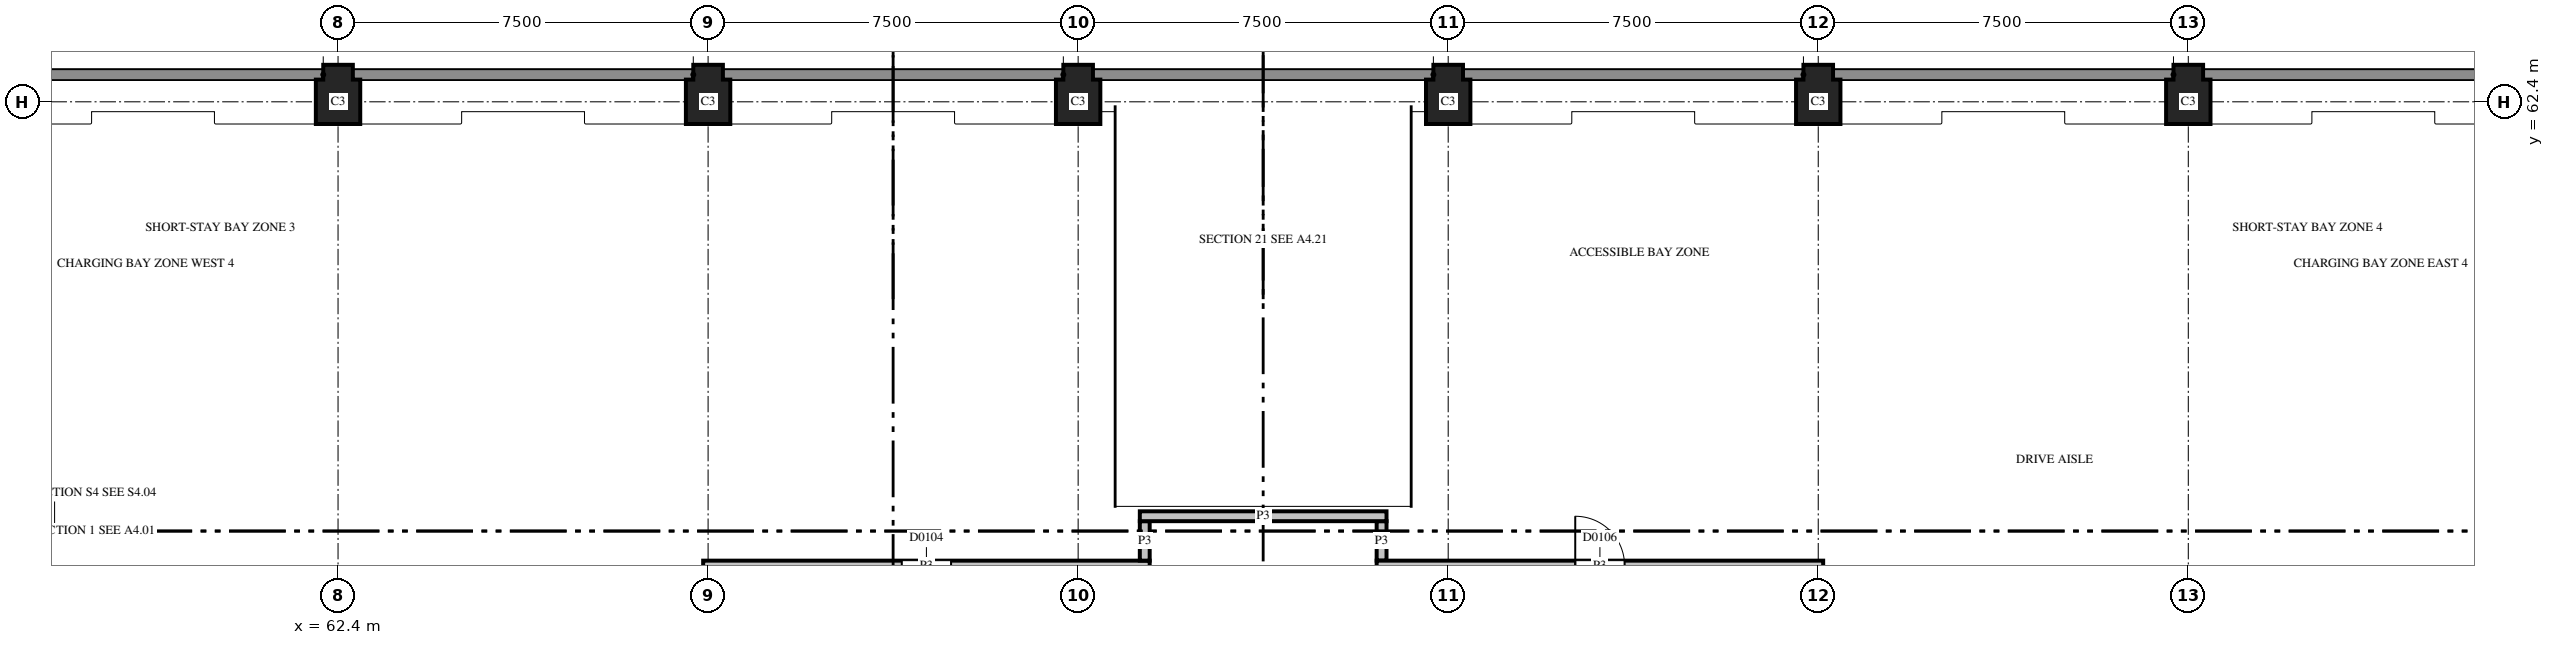
"""IFC4 building model, lengths in metres.
Left out: names, types, materials, properties, quantities, classifications, styles, units other than length and angle.
Written with IfcOpenShell. Run it as: python <this file> out.ifc"""

import sys

from ifc_helpers import new_model, si_unit, direction, frame, frame_2d, origin, place, context, subcontext, project, spatial, polyline, rectangle, outline, extrude, element, fill, save


model = new_model("IFC4")
c1 = context("Model", 3, precision=1e-05, world=origin(), true_north=direction((0.0, 1.0)))
c2 = subcontext(c1, "Body", "Model", "MODEL_VIEW")
j1 = project(units=[si_unit("LENGTHUNIT", "METRE"), si_unit("PLANEANGLEUNIT", "RADIAN")], contexts=[c1])
p1 = place(None, origin())
s1 = spatial("IfcSite", under=j1, at=p1, CompositionType="ELEMENT")
p2 = place(p1, origin())
s2 = spatial("IfcBuilding", under=s1, at=p2, CompositionType="ELEMENT")
p3 = place(p2, frame((0.0, 0.0, 4.5)))
s3 = spatial("IfcBuildingStorey", under=s2, at=p3, CompositionType="ELEMENT", Elevation=4.5)
for number, where, z_axis, x_axis in (
    (1, (62.4, 62.4, 0.0), (0.0, 0.0, 1.0), (0.0, 1.0, 0.0)),
    (2, (69.9, 62.4, 0.0), (0.0, 0.0, 1.0), (0.0, 1.0, 0.0)),
    (3, (77.4, 62.4, 0.0), (0.0, 0.0, 1.0), (0.0, 1.0, 0.0)),
    (4, (84.9, 62.4, 0.0), (0.0, 0.0, 1.0), (0.0, 1.0, 0.0)),
    (5, (92.4, 62.4, 0.0), (0.0, 0.0, 1.0), (0.0, 1.0, 0.0)),
    (6, (99.9, 62.4, 0.0), (0.0, 0.0, 1.0), (0.0, 1.0, 0.0)),
):
    element("IfcColumn", number, at=place(p3, frame(where, z_axis=z_axis, x_axis=x_axis)), inside=s3, PredefinedType="COLUMN", context=c2, shape_type="SweptSolid", body=[
        extrude(outline(polyline([(-0.45, -0.45), (0.45, -0.45), (0.45, -0.3), (0.75, -0.3), (0.75, 0.3), (0.45, 0.3), (0.45, 0.45), (-0.45, 0.45), (-0.45, -0.45)])), origin(), (0.0, 0.0, 1.0), 3.7),
    ])
p4 = place(p3, frame((78.85, 53.0, 0.0), z_axis=(0.0, 0.0, 1.0), x_axis=(-1.0, 0.0, 0.0)))
e7 = element("IfcWall", 7, at=p4, inside=s3, PredefinedType="PARTITIONING", context=c2, shape_type="SweptSolid", body=[
    extrude(rectangle(XDim=9.05, YDim=0.2, at=frame_2d((4.525, 0.0))), origin(), (0.0, 0.0, 1.0), 2.88),
])
p5 = place(p4, frame((4.025, 0.0, 0.0)))
e8 = element("IfcOpeningElement", 8, at=p5, cuts=e7, PredefinedType="OPENING", context=c2, shape_type="SweptSolid", body=[
    extrude(rectangle(XDim=1.0, YDim=2.1, at=frame_2d((0.5, 1.05))), frame((0.0, 0.11, 0.0), z_axis=(0.0, -1.0, 0.0), x_axis=(1.0, 0.0, 0.0)), (0.0, 0.0, 1.0), 0.22),
])
p6 = place(p3, frame((83.55, 53.1, 0.0), z_axis=(0.0, 0.0, 1.0), x_axis=(0.0, 1.0, 0.0)))
e9 = element("IfcWall", 9, at=p6, inside=s3, PredefinedType="PARTITIONING", context=c2, shape_type="SweptSolid", body=[
    extrude(rectangle(XDim=0.8, YDim=0.2, at=frame_2d((0.4, 0.0))), origin(), (0.0, 0.0, 1.0), 2.88),
])
p7 = place(p3, frame((92.5, 53.0, 0.0), z_axis=(0.0, 0.0, 1.0), x_axis=(-1.0, 0.0, 0.0)))
e10 = element("IfcWall", 10, at=p7, inside=s3, PredefinedType="PARTITIONING", context=c2, shape_type="SweptSolid", body=[
    extrude(rectangle(XDim=9.05, YDim=0.2, at=frame_2d((4.525, 0.0))), origin(), (0.0, 0.0, 1.0), 2.88),
])
p8 = place(p7, frame((4.025, 0.0, 0.0)))
e11 = element("IfcOpeningElement", 11, at=p8, cuts=e10, PredefinedType="OPENING", context=c2, shape_type="SweptSolid", body=[
    extrude(rectangle(XDim=1.0, YDim=2.1, at=frame_2d((0.5, 1.05))), frame((0.0, 0.11, 0.0), z_axis=(0.0, -1.0, 0.0), x_axis=(1.0, 0.0, 0.0)), (0.0, 0.0, 1.0), 0.22),
])
p9 = place(p3, frame((78.75, 53.9, 0.0), z_axis=(0.0, 0.0, 1.0), x_axis=(0.0, -1.0, 0.0)))
e12 = element("IfcWall", 12, at=p9, inside=s3, PredefinedType="PARTITIONING", context=c2, shape_type="SweptSolid", body=[
    extrude(rectangle(XDim=0.8, YDim=0.2, at=frame_2d((0.4, 0.0))), origin(), (0.0, 0.0, 1.0), 2.88),
])
p10 = place(p3, frame((83.65, 54.0, 0.0), z_axis=(0.0, 0.0, 1.0), x_axis=(-1.0, 0.0, 0.0)))
e13 = element("IfcWall", 13, at=p10, inside=s3, PredefinedType="PARTITIONING", context=c2, shape_type="SweptSolid", body=[
    extrude(rectangle(XDim=5.0, YDim=0.2, at=frame_2d((2.5, 0.0))), origin(), (0.0, 0.0, 1.0), 2.88),
])
p11 = place(p5, origin())
e14 = element("IfcDoor", 14, at=p11, inside=s3, OperationType="SINGLE_SWING_LEFT", PredefinedType="DOOR", context=c2, shape_type="SweptSolid", body=[
    extrude(rectangle(XDim=1.0, YDim=2.1, at=frame_2d((0.5, 1.05))), frame((0.0, 0.025, 0.0), z_axis=(0.0, -1.0, 0.0), x_axis=(1.0, 0.0, 0.0)), (0.0, 0.0, 1.0), 0.05),
])
fill(e8, e14)
p12 = place(p8, origin())
e15 = element("IfcDoor", 15, at=p12, inside=s3, OperationType="SINGLE_SWING_RIGHT", PredefinedType="DOOR", context=c2, shape_type="SweptSolid", body=[
    extrude(rectangle(XDim=1.0, YDim=2.1, at=frame_2d((0.5, 1.05))), frame((0.0, 0.025, 0.0), z_axis=(0.0, -1.0, 0.0), x_axis=(1.0, 0.0, 0.0)), (0.0, 0.0, 1.0), 0.05),
])
fill(e11, e15)
save(model, sys.argv[1])
